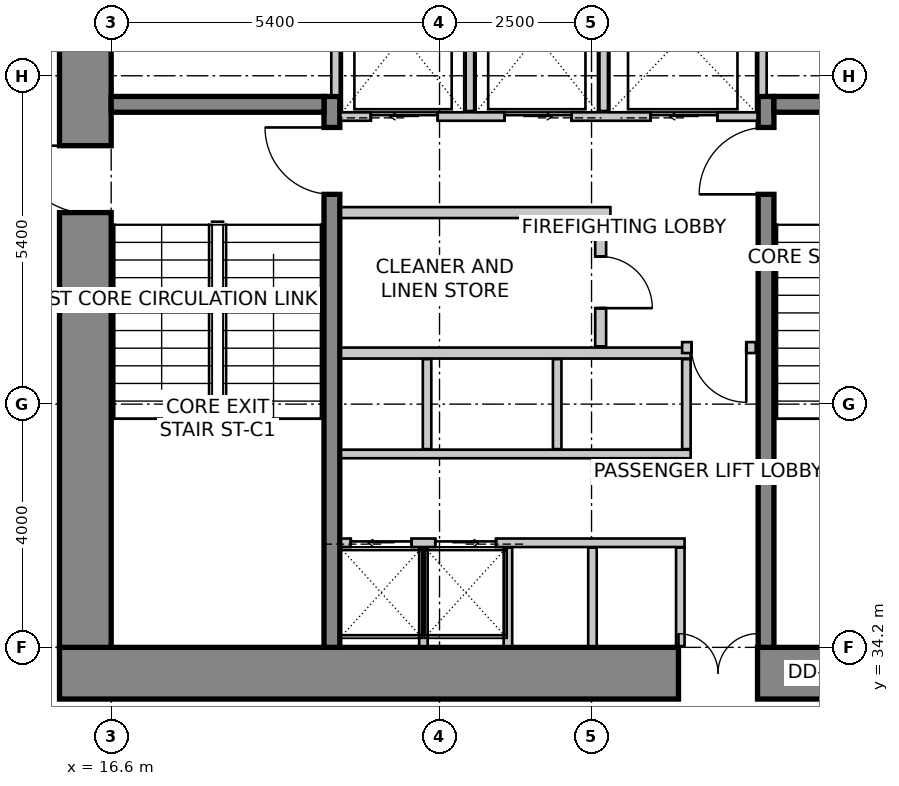
"""IFC4 building model, lengths in metres.
Left out: names, types, materials, properties, quantities, classifications, styles, units other than length and angle.
Written with IfcOpenShell. Run it as: python <this file> out.ifc"""

import sys

from ifc_helpers import new_model, si_unit, direction, frame, frame_2d, origin, place, context, subcontext, project, spatial, rectangle, extrude, source, transform, mapped, element, fill, save


model = new_model("IFC4")
c1 = context("Model", 3, precision=1e-05, world=origin(), true_north=direction((0.0, 1.0)))
c2 = subcontext(c1, "Body", "Model", "MODEL_VIEW")
j1 = project(units=[si_unit("LENGTHUNIT", "METRE"), si_unit("PLANEANGLEUNIT", "RADIAN")], contexts=[c1])
p1 = place(None, origin())
s1 = spatial("IfcSite", under=j1, at=p1, CompositionType="ELEMENT")
p2 = place(p1, origin())
s2 = spatial("IfcBuilding", under=s1, at=p2, CompositionType="ELEMENT")
p3 = place(p2, frame((0.0, 0.0, 31.0)))
s3 = spatial("IfcBuildingStorey", under=s2, at=p3, CompositionType="ELEMENT", Elevation=31.0)
p4 = place(p3, frame((15.75, 33.775, 0.0), z_axis=(0.0, 0.0, 1.0), x_axis=(1.0, 0.0, 0.0)))
e1 = element("IfcWall", 1, at=p4, inside=s3, PredefinedType="SHEAR", context=c2, shape_type="SweptSolid", body=[
    extrude(rectangle(XDim=16.1, YDim=0.85, at=frame_2d((8.05, 0.0))), origin(), (0.0, 0.0, 1.0), 4.0),
])
m1 = source(origin(), c2, "Body", "SweptSolid", [
    extrude(rectangle(XDim=1.3, YDim=2.15, at=frame_2d((0.65, 1.075))), frame((0.0, 0.435, 0.0), z_axis=(0.0, -1.0, 0.0), x_axis=(1.0, 0.0, 0.0)), (0.0, 0.0, 1.0), 0.87),
])
p5 = place(p4, frame((10.18, 0.0, 0.0)))
e2 = element("IfcOpeningElement", 2, at=p5, cuts=e1, PredefinedType="OPENING", context=c2, shape_type="MappedRepresentation", body=[
    mapped(m1, transform((0.0, 0.0, 0.0), scale=1.0)),
])
p6 = place(p3, frame((16.175, 34.2, 0.0), z_axis=(0.0, 0.0, 1.0), x_axis=(0.0, 1.0, 0.0)))
e3 = element("IfcWall", 3, at=p6, inside=s3, PredefinedType="SHEAR", context=c2, shape_type="SweptSolid", body=[
    extrude(rectangle(XDim=11.4, YDim=0.85, at=frame_2d((5.7, 0.0))), origin(), (0.0, 0.0, 1.0), 4.0),
])
m2 = source(origin(), c2, "Body", "SweptSolid", [
    extrude(rectangle(XDim=1.1, YDim=2.15, at=frame_2d((0.55, 1.075))), frame((0.0, 0.435, 0.0), z_axis=(0.0, -1.0, 0.0), x_axis=(1.0, 0.0, 0.0)), (0.0, 0.0, 1.0), 0.87),
])
p7 = place(p6, frame((7.15, 0.0, 0.0)))
e4 = element("IfcOpeningElement", 4, at=p7, cuts=e3, PredefinedType="OPENING", context=c2, shape_type="MappedRepresentation", body=[
    mapped(m2, transform((0.0, 0.0, 0.0), scale=1.0)),
])
p8 = place(p3, frame((20.23, 34.2, 0.0), z_axis=(0.0, 0.0, 1.0), x_axis=(0.0, 1.0, 0.0)))
e5 = element("IfcWall", 5, at=p8, inside=s3, PredefinedType="SHEAR", context=c2, shape_type="SweptSolid", body=[
    extrude(rectangle(XDim=9.06, YDim=0.26, at=frame_2d((4.53, 0.0))), origin(), (0.0, 0.0, 1.0), 4.0),
])
m3 = source(origin(), c2, "Body", "SweptSolid", [
    extrude(rectangle(XDim=1.1, YDim=2.15, at=frame_2d((0.55, 1.075))), frame((0.0, 0.14, 0.0), z_axis=(0.0, -1.0, 0.0), x_axis=(1.0, 0.0, 0.0)), (0.0, 0.0, 1.0), 0.28),
])
p9 = place(p8, frame((7.45, 0.0, 0.0)))
e6 = element("IfcOpeningElement", 6, at=p9, cuts=e5, PredefinedType="OPENING", context=c2, shape_type="MappedRepresentation", body=[
    mapped(m3, transform((0.0, 0.0, 0.0), scale=1.0)),
])
p10 = place(p3, frame((27.37, 34.2, 0.0), z_axis=(0.0, 0.0, 1.0), x_axis=(0.0, 1.0, 0.0)))
e7 = element("IfcWall", 7, at=p10, inside=s3, PredefinedType="SHEAR", context=c2, shape_type="SweptSolid", body=[
    extrude(rectangle(XDim=9.06, YDim=0.26, at=frame_2d((4.53, 0.0))), origin(), (0.0, 0.0, 1.0), 4.0),
])
p11 = place(p10, frame((7.45, 0.0, 0.0)))
e8 = element("IfcOpeningElement", 8, at=p11, cuts=e7, PredefinedType="OPENING", context=c2, shape_type="MappedRepresentation", body=[
    mapped(m3, transform((0.0, 0.0, 0.0), scale=1.0)),
])
for number, where, z_axis, x_axis in (
    (9, (16.6, 43.13, 0.0), (0.0, 0.0, 1.0), (1.0, 0.0, 0.0)),
    (10, (27.5, 43.13, 0.0), (0.0, 0.0, 1.0), (1.0, 0.0, 0.0)),
):
    element("IfcWall", number, at=place(p3, frame(where, z_axis=z_axis, x_axis=x_axis)), inside=s3, PredefinedType="SHEAR", context=c2, shape_type="SweptSolid", body=[
        extrude(rectangle(XDim=3.5, YDim=0.26, at=frame_2d((1.75, 0.0))), origin(), (0.0, 0.0, 1.0), 4.0),
    ])
p12 = place(p3, frame((20.37, 42.93, 0.0), z_axis=(0.0, 0.0, 1.0), x_axis=(1.0, 0.0, 0.0)))
e11 = element("IfcWall", 11, at=p12, inside=s3, PredefinedType="SOLIDWALL", context=c2, shape_type="SweptSolid", body=[
    extrude(rectangle(XDim=6.86, YDim=0.14, at=frame_2d((3.43, 0.0))), origin(), (0.0, 0.0, 1.0), 3.75),
])
m4 = source(origin(), c2, "Body", "SweptSolid", [
    extrude(rectangle(XDim=1.1, YDim=2.15, at=frame_2d((0.55, 1.075))), frame((0.0, 0.08, 0.0), z_axis=(0.0, -1.0, 0.0), x_axis=(1.0, 0.0, 0.0)), (0.0, 0.0, 1.0), 0.16),
])
p13 = place(p12, frame((0.5, 0.0, 0.0)))
e12 = element("IfcOpeningElement", 12, at=p13, cuts=e11, PredefinedType="OPENING", context=c2, shape_type="MappedRepresentation", body=[
    mapped(m4, transform((0.0, 0.0, 0.0), scale=1.0)),
])
p14 = place(p12, frame((2.7, 0.0, 0.0)))
e13 = element("IfcOpeningElement", 13, at=p14, cuts=e11, PredefinedType="OPENING", context=c2, shape_type="MappedRepresentation", body=[
    mapped(m4, transform((0.0, 0.0, 0.0), scale=1.0)),
])
p15 = place(p12, frame((5.1, 0.0, 0.0)))
e14 = element("IfcOpeningElement", 14, at=p15, cuts=e11, PredefinedType="OPENING", context=c2, shape_type="MappedRepresentation", body=[
    mapped(m4, transform((0.0, 0.0, 0.0), scale=1.0)),
])
for number, where, z_axis, x_axis in (
    (15, (20.29, 43.28, 0.0), (0.0, 0.0, 1.0), (0.0, 1.0, 0.0)),
    (16, (27.31, 43.28, 0.0), (0.0, 0.0, 1.0), (0.0, 1.0, 0.0)),
):
    element("IfcWall", number, at=place(p3, frame(where, z_axis=z_axis, x_axis=x_axis)), inside=s3, PredefinedType="SOLIDWALL", context=c2, shape_type="SweptSolid", body=[
        extrude(rectangle(XDim=2.3, YDim=0.14, at=frame_2d((1.15, 0.0))), origin(), (0.0, 0.0, 1.0), 3.75),
    ])
for number, where, z_axis, x_axis in (
    (17, (22.5, 43.02, 0.0), (0.0, 0.0, 1.0), (0.0, 1.0, 0.0)),
    (18, (24.7, 43.02, 0.0), (0.0, 0.0, 1.0), (0.0, 1.0, 0.0)),
):
    element("IfcWall", number, at=place(p3, frame(where, z_axis=z_axis, x_axis=x_axis)), inside=s3, PredefinedType="SOLIDWALL", context=c2, shape_type="SweptSolid", body=[
        extrude(rectangle(XDim=2.56, YDim=0.14, at=frame_2d((1.28, 0.0))), origin(), (0.0, 0.0, 1.0), 3.75),
    ])
p16 = place(p3, frame((20.38, 35.92, 0.0), z_axis=(0.0, 0.0, 1.0), x_axis=(1.0, 0.0, 0.0)))
e19 = element("IfcWall", 19, at=p16, inside=s3, PredefinedType="SOLIDWALL", context=c2, shape_type="SweptSolid", body=[
    extrude(rectangle(XDim=5.65, YDim=0.14, at=frame_2d((2.825, 0.0))), origin(), (0.0, 0.0, 1.0), 3.75),
])
m5 = source(origin(), c2, "Body", "SweptSolid", [
    extrude(rectangle(XDim=1.0, YDim=2.15, at=frame_2d((0.5, 1.075))), frame((0.0, 0.08, 0.0), z_axis=(0.0, -1.0, 0.0), x_axis=(1.0, 0.0, 0.0)), (0.0, 0.0, 1.0), 0.16),
])
p17 = place(p16, frame((0.16, 0.0, 0.0)))
e20 = element("IfcOpeningElement", 20, at=p17, cuts=e19, PredefinedType="OPENING", context=c2, shape_type="MappedRepresentation", body=[
    mapped(m5, transform((0.0, 0.0, 0.0), scale=1.0)),
])
p18 = place(p16, frame((1.55, 0.0, 0.0)))
e21 = element("IfcOpeningElement", 21, at=p18, cuts=e19, PredefinedType="OPENING", context=c2, shape_type="MappedRepresentation", body=[
    mapped(m5, transform((0.0, 0.0, 0.0), scale=1.0)),
])
for number, where, z_axis, x_axis in (
    (22, (25.96, 34.22, 0.0), (0.0, 0.0, 1.0), (0.0, 1.0, 0.0)),
    (23, (21.735, 34.22, 0.0), (0.0, 0.0, 1.0), (0.0, 1.0, 0.0)),
    (24, (23.125, 34.22, 0.0), (0.0, 0.0, 1.0), (0.0, 1.0, 0.0)),
    (25, (24.515, 34.22, 0.0), (0.0, 0.0, 1.0), (0.0, 1.0, 0.0)),
):
    element("IfcWall", number, at=place(p3, frame(where, z_axis=z_axis, x_axis=x_axis)), inside=s3, PredefinedType="SOLIDWALL", context=c2, shape_type="SweptSolid", body=[
        extrude(rectangle(XDim=1.62, YDim=0.14, at=frame_2d((0.81, 0.0))), origin(), (0.0, 0.0, 1.0), 3.042),
    ])
p19 = place(p3, frame((20.38, 37.38, 0.0), z_axis=(0.0, 0.0, 1.0), x_axis=(1.0, 0.0, 0.0)))
e26 = element("IfcWall", 26, at=p19, inside=s3, PredefinedType="SOLIDWALL", context=c2, shape_type="SweptSolid", body=[
    extrude(rectangle(XDim=5.75, YDim=0.14, at=frame_2d((2.875, 0.0))), origin(), (0.0, 0.0, 1.0), 3.75),
])
p20 = place(p3, frame((20.38, 39.04, 0.0), z_axis=(0.0, 0.0, 1.0), x_axis=(1.0, 0.0, 0.0)))
e27 = element("IfcWall", 27, at=p20, inside=s3, PredefinedType="SOLIDWALL", context=c2, shape_type="SweptSolid", body=[
    extrude(rectangle(XDim=5.75, YDim=0.18, at=frame_2d((2.875, 0.0))), origin(), (0.0, 0.0, 1.0), 3.75),
])
for number, where, z_axis, x_axis in (
    (28, (26.06, 37.46, 0.0), (0.0, 0.0, 1.0), (0.0, 1.0, 0.0)),
    (29, (21.795, 37.46, 0.0), (0.0, 0.0, 1.0), (0.0, 1.0, 0.0)),
    (30, (23.935, 37.46, 0.0), (0.0, 0.0, 1.0), (0.0, 1.0, 0.0)),
):
    element("IfcWall", number, at=place(p3, frame(where, z_axis=z_axis, x_axis=x_axis)), inside=s3, PredefinedType="SOLIDWALL", context=c2, shape_type="SweptSolid", body=[
        extrude(rectangle(XDim=1.48, YDim=0.14, at=frame_2d((0.74, 0.0))), origin(), (0.0, 0.0, 1.0), 3.75),
    ])
p21 = place(p3, frame((24.81, 41.35, 0.0), z_axis=(0.0, 0.0, 1.0), x_axis=(-1.0, 0.0, 0.0)))
e31 = element("IfcWall", 31, at=p21, inside=s3, PredefinedType="PARTITIONING", context=c2, shape_type="SweptSolid", body=[
    extrude(rectangle(XDim=4.43, YDim=0.18, at=frame_2d((2.215, 0.0))), origin(), (0.0, 0.0, 1.0), 3.75),
])
p22 = place(p3, frame((24.65, 41.256, 0.0), z_axis=(0.0, 0.0, 1.0), x_axis=(0.0, -1.0, 0.0)))
e32 = element("IfcWall", 32, at=p22, inside=s3, PredefinedType="PARTITIONING", context=c2, shape_type="SweptSolid", body=[
    extrude(rectangle(XDim=2.106, YDim=0.18, at=frame_2d((1.053, 0.0))), origin(), (0.0, 0.0, 1.0), 3.75),
])
m6 = source(origin(), c2, "Body", "SweptSolid", [
    extrude(rectangle(XDim=0.85, YDim=2.15, at=frame_2d((0.425, 1.075))), frame((0.0, 0.1, 0.0), z_axis=(0.0, -1.0, 0.0), x_axis=(1.0, 0.0, 0.0)), (0.0, 0.0, 1.0), 0.2),
])
p23 = place(p22, frame((0.628, 0.0, 0.0)))
e33 = element("IfcOpeningElement", 33, at=p23, cuts=e32, PredefinedType="OPENING", context=c2, shape_type="MappedRepresentation", body=[
    mapped(m6, transform((0.0, 0.0, 0.0), scale=1.0)),
])
p24 = place(p3, frame((27.2, 39.13, 0.0), z_axis=(0.0, 0.0, 1.0), x_axis=(-1.0, 0.0, 0.0)))
e34 = element("IfcWall", 34, at=p24, inside=s3, PredefinedType="PARTITIONING", context=c2, shape_type="SweptSolid", body=[
    extrude(rectangle(XDim=1.21, YDim=0.18, at=frame_2d((0.605, 0.0))), origin(), (0.0, 0.0, 1.0), 3.75),
])
m7 = source(origin(), c2, "Body", "SweptSolid", [
    extrude(rectangle(XDim=0.9, YDim=2.15, at=frame_2d((0.45, 1.075))), frame((0.0, 0.1, 0.0), z_axis=(0.0, -1.0, 0.0), x_axis=(1.0, 0.0, 0.0)), (0.0, 0.0, 1.0), 0.2),
])
p25 = place(p24, frame((0.155, 0.0, 0.0)))
e35 = element("IfcOpeningElement", 35, at=p25, cuts=e34, PredefinedType="OPENING", context=c2, shape_type="MappedRepresentation", body=[
    mapped(m7, transform((0.0, 0.0, 0.0), scale=1.0)),
])
m8 = source(origin(), c2, "Body", "SweptSolid", [
    extrude(rectangle(XDim=1.1, YDim=2.15, at=frame_2d((0.55, 1.075))), frame((0.0, 0.025, 0.0), z_axis=(0.0, -1.0, 0.0), x_axis=(1.0, 0.0, 0.0)), (0.0, 0.0, 1.0), 0.05),
])
p26 = place(p13, origin())
e36 = element("IfcDoor", 36, at=p26, inside=s3, OperationType="SLIDING_TO_LEFT", PredefinedType="DOOR", context=c2, shape_type="MappedRepresentation", body=[
    mapped(m8, transform((0.0, 0.0, 0.0), scale=1.0)),
])
fill(e12, e36)
p27 = place(p14, origin())
e37 = element("IfcDoor", 37, at=p27, inside=s3, OperationType="SLIDING_TO_RIGHT", PredefinedType="DOOR", context=c2, shape_type="MappedRepresentation", body=[
    mapped(m8, transform((0.0, 0.0, 0.0), scale=1.0)),
])
fill(e13, e37)
m9 = source(origin(), c2, "Body", "SweptSolid", [
    extrude(rectangle(XDim=1.1, YDim=2.15, at=frame_2d((0.55, 1.075))), frame((0.0, 0.025, 0.0), z_axis=(0.0, -1.0, 0.0), x_axis=(1.0, 0.0, 0.0)), (0.0, 0.0, 1.0), 0.05),
])
p28 = place(p15, origin())
e38 = element("IfcDoor", 38, at=p28, inside=s3, OperationType="SLIDING_TO_LEFT", PredefinedType="DOOR", context=c2, shape_type="MappedRepresentation", body=[
    mapped(m9, transform((0.0, 0.0, 0.0), scale=1.0)),
])
fill(e14, e38)
m10 = source(origin(), c2, "Body", "SweptSolid", [
    extrude(rectangle(XDim=1.0, YDim=2.15, at=frame_2d((0.5, 1.075))), frame((0.0, 0.025, 0.0), z_axis=(0.0, -1.0, 0.0), x_axis=(1.0, 0.0, 0.0)), (0.0, 0.0, 1.0), 0.05),
])
p29 = place(p17, origin())
e39 = element("IfcDoor", 39, at=p29, inside=s3, OperationType="SLIDING_TO_LEFT", PredefinedType="DOOR", context=c2, shape_type="MappedRepresentation", body=[
    mapped(m10, transform((0.0, 0.0, 0.0), scale=1.0)),
])
fill(e20, e39)
p30 = place(p18, origin())
e40 = element("IfcDoor", 40, at=p30, inside=s3, OperationType="SLIDING_TO_RIGHT", PredefinedType="DOOR", context=c2, shape_type="MappedRepresentation", body=[
    mapped(m10, transform((0.0, 0.0, 0.0), scale=1.0)),
])
fill(e21, e40)
m11 = source(origin(), c2, "Body", "SweptSolid", [
    extrude(rectangle(XDim=1.1, YDim=2.15, at=frame_2d((0.55, 1.075))), frame((0.0, 0.025, 0.0), z_axis=(0.0, -1.0, 0.0), x_axis=(1.0, 0.0, 0.0)), (0.0, 0.0, 1.0), 0.05),
])
p31 = place(p9, origin())
e41 = element("IfcDoor", 41, at=p31, inside=s3, OperationType="SINGLE_SWING_RIGHT", PredefinedType="DOOR", context=c2, shape_type="MappedRepresentation", body=[
    mapped(m11, transform((0.0, 0.0, 0.0), scale=1.0)),
])
fill(e6, e41)
p32 = place(p11, origin())
e42 = element("IfcDoor", 42, at=p32, inside=s3, OperationType="SINGLE_SWING_LEFT", PredefinedType="DOOR", context=c2, shape_type="MappedRepresentation", body=[
    mapped(m11, transform((0.0, 0.0, 0.0), scale=1.0)),
])
fill(e8, e42)
p33 = place(p7, origin())
e43 = element("IfcDoor", 43, at=p33, inside=s3, OperationType="SINGLE_SWING_RIGHT", PredefinedType="DOOR", context=c2, shape_type="MappedRepresentation", body=[
    mapped(m11, transform((0.0, 0.0, 0.0), scale=1.0)),
])
fill(e4, e43)
m12 = source(origin(), c2, "Body", "SweptSolid", [
    extrude(rectangle(XDim=1.3, YDim=2.15, at=frame_2d((0.65, 1.075))), frame((0.0, 0.025, 0.0), z_axis=(0.0, -1.0, 0.0), x_axis=(1.0, 0.0, 0.0)), (0.0, 0.0, 1.0), 0.05),
])
p34 = place(p5, origin())
e44 = element("IfcDoor", 44, at=p34, inside=s3, OperationType="DOUBLE_DOOR_SINGLE_SWING", PredefinedType="DOOR", context=c2, shape_type="MappedRepresentation", body=[
    mapped(m12, transform((0.0, 0.0, 0.0), scale=1.0)),
])
fill(e2, e44)
m13 = source(origin(), c2, "Body", "SweptSolid", [
    extrude(rectangle(XDim=0.85, YDim=2.15, at=frame_2d((0.425, 1.075))), frame((0.0, 0.025, 0.0), z_axis=(0.0, -1.0, 0.0), x_axis=(1.0, 0.0, 0.0)), (0.0, 0.0, 1.0), 0.05),
])
p35 = place(p23, origin())
e45 = element("IfcDoor", 45, at=p35, inside=s3, OperationType="SINGLE_SWING_RIGHT", PredefinedType="DOOR", context=c2, shape_type="MappedRepresentation", body=[
    mapped(m13, transform((0.0, 0.0, 0.0), scale=1.0)),
])
fill(e33, e45)
m14 = source(origin(), c2, "Body", "SweptSolid", [
    extrude(rectangle(XDim=0.9, YDim=2.15, at=frame_2d((0.45, 1.075))), frame((0.0, 0.025, 0.0), z_axis=(0.0, -1.0, 0.0), x_axis=(1.0, 0.0, 0.0)), (0.0, 0.0, 1.0), 0.05),
])
p36 = place(p25, origin())
e46 = element("IfcDoor", 46, at=p36, inside=s3, OperationType="SINGLE_SWING_LEFT", PredefinedType="DOOR", context=c2, shape_type="MappedRepresentation", body=[
    mapped(m14, transform((0.0, 0.0, 0.0), scale=1.0)),
])
fill(e35, e46)
save(model, sys.argv[1])
